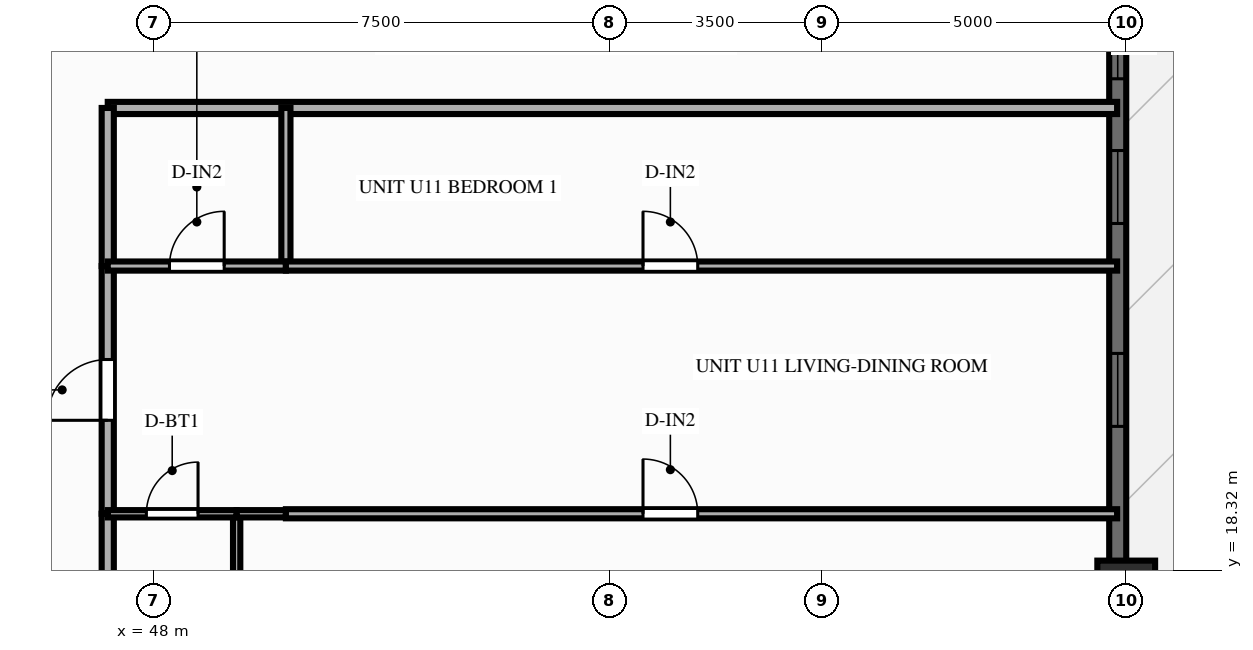
"""IFC4 building model, lengths in metres.
Left out: names, types, materials, properties, quantities, classifications, styles, units other than length and angle.
Written with IfcOpenShell. Run it as: python <this file> out.ifc"""

import sys

from ifc_helpers import new_model, si_unit, direction, frame, frame_2d, origin, origin_2d, place, context, subcontext, project, spatial, rectangle, extrude, source, transform, mapped, element, fill, save


model = new_model("IFC4")
c1 = context("Model", 3, precision=1e-05, world=origin(), true_north=direction((0.0, 1.0)))
c2 = subcontext(c1, "Body", "Model", "MODEL_VIEW")
j1 = project(units=[si_unit("LENGTHUNIT", "METRE"), si_unit("PLANEANGLEUNIT", "RADIAN")], contexts=[c1])
p1 = place(None, origin())
s1 = spatial("IfcSite", under=j1, at=p1, CompositionType="ELEMENT")
p2 = place(p1, origin())
s2 = spatial("IfcBuilding", under=s1, at=p2, CompositionType="ELEMENT")
p3 = place(p2, frame((0.0, 0.0, 107.85)))
s3 = spatial("IfcBuildingStorey", under=s2, at=p3, CompositionType="ELEMENT", Elevation=107.85)
m1 = source(origin(), c2, "Body", "SweptSolid", [
    extrude(rectangle(XDim=0.95, YDim=0.95, at=origin_2d()), origin(), (0.0, 0.0, 1.0), 3.0),
])
p4 = place(p3, frame((64.0, 18.0, 0.0), z_axis=(0.0, 0.0, 1.0), x_axis=(1.0, 0.0, 0.0)))
e1 = element("IfcColumn", 1, at=p4, inside=s3, PredefinedType="COLUMN", context=c2, shape_type="MappedRepresentation", body=[
    mapped(m1, transform((0.0, 0.0, 0.0), scale=1.0)),
])
p5 = place(p3, frame((63.86, 7.2, 0.0), z_axis=(0.0, 0.0, 1.0), x_axis=(0.0, 1.0, 0.0)))
e2 = element("IfcWall", 2, at=p5, inside=s3, PredefinedType="SOLIDWALL", context=c2, shape_type="SweptSolid", body=[
    extrude(rectangle(XDim=39.6, YDim=0.28, at=frame_2d((19.8, 0.0))), origin(), (0.0, 0.0, 1.0), 2.28),
])
p6 = place(p5, frame((0.945, 0.0, 0.25)))
e3 = element("IfcOpeningElement", 3, at=p6, cuts=e2, PredefinedType="OPENING", context=c2, shape_type="SweptSolid", body=[
    extrude(rectangle(XDim=1.2, YDim=1.5, at=frame_2d((0.6, 0.75))), frame((0.0, 0.152, 0.0), z_axis=(0.0, -1.0, 0.0), x_axis=(1.0, 0.0, 0.0)), (0.0, 0.0, 1.0), 0.304),
])
p7 = place(p5, frame((4.213, 0.0, 0.25)))
e4 = element("IfcOpeningElement", 4, at=p7, cuts=e2, PredefinedType="OPENING", context=c2, shape_type="SweptSolid", body=[
    extrude(rectangle(XDim=1.2, YDim=1.5, at=frame_2d((0.6, 0.75))), frame((0.0, 0.152, 0.0), z_axis=(0.0, -1.0, 0.0), x_axis=(1.0, 0.0, 0.0)), (0.0, 0.0, 1.0), 0.304),
])
p8 = place(p5, frame((7.55, 0.0, 0.25)))
e5 = element("IfcOpeningElement", 5, at=p8, cuts=e2, PredefinedType="OPENING", context=c2, shape_type="SweptSolid", body=[
    extrude(rectangle(XDim=1.2, YDim=1.5, at=frame_2d((0.6, 0.75))), frame((0.0, 0.152, 0.0), z_axis=(0.0, -1.0, 0.0), x_axis=(1.0, 0.0, 0.0)), (0.0, 0.0, 1.0), 0.304),
])
p9 = place(p5, frame((13.483, 0.0, 0.25)))
e6 = element("IfcOpeningElement", 6, at=p9, cuts=e2, PredefinedType="OPENING", context=c2, shape_type="SweptSolid", body=[
    extrude(rectangle(XDim=1.2, YDim=1.5, at=frame_2d((0.6, 0.75))), frame((0.0, 0.152, 0.0), z_axis=(0.0, -1.0, 0.0), x_axis=(1.0, 0.0, 0.0)), (0.0, 0.0, 1.0), 0.304),
])
p10 = place(p5, frame((16.82, 0.0, 0.25)))
e7 = element("IfcOpeningElement", 7, at=p10, cuts=e2, PredefinedType="OPENING", context=c2, shape_type="SweptSolid", body=[
    extrude(rectangle(XDim=1.2, YDim=1.5, at=frame_2d((0.6, 0.75))), frame((0.0, 0.152, 0.0), z_axis=(0.0, -1.0, 0.0), x_axis=(1.0, 0.0, 0.0)), (0.0, 0.0, 1.0), 0.304),
])
p11 = place(p5, frame((19.2, 0.0, 0.25)))
e8 = element("IfcOpeningElement", 8, at=p11, cuts=e2, PredefinedType="OPENING", context=c2, shape_type="SweptSolid", body=[
    extrude(rectangle(XDim=1.2, YDim=1.5, at=frame_2d((0.6, 0.75))), frame((0.0, 0.152, 0.0), z_axis=(0.0, -1.0, 0.0), x_axis=(1.0, 0.0, 0.0)), (0.0, 0.0, 1.0), 0.304),
])
p12 = place(p5, frame((21.578, 0.0, 0.25)))
e9 = element("IfcOpeningElement", 9, at=p12, cuts=e2, PredefinedType="OPENING", context=c2, shape_type="SweptSolid", body=[
    extrude(rectangle(XDim=1.2, YDim=1.5, at=frame_2d((0.6, 0.75))), frame((0.0, 0.152, 0.0), z_axis=(0.0, -1.0, 0.0), x_axis=(1.0, 0.0, 0.0)), (0.0, 0.0, 1.0), 0.304),
])
p13 = place(p5, frame((26.313, 0.0, 0.0), z_axis=(0.0, 0.0, 1.0), x_axis=(-1.0, 0.0, 0.0)))
e10 = element("IfcOpeningElement", 10, at=p13, cuts=e2, PredefinedType="OPENING", context=c2, shape_type="SweptSolid", body=[
    extrude(rectangle(XDim=1.6, YDim=2.15, at=frame_2d((0.8, 1.075))), frame((0.0, 0.152, 0.0), z_axis=(0.0, -1.0, 0.0), x_axis=(1.0, 0.0, 0.0)), (0.0, 0.0, 1.0), 0.304),
])
p14 = place(p5, frame((29.305, 0.0, 0.25)))
e11 = element("IfcOpeningElement", 11, at=p14, cuts=e2, PredefinedType="OPENING", context=c2, shape_type="SweptSolid", body=[
    extrude(rectangle(XDim=0.7, YDim=1.5, at=frame_2d((0.35, 0.75))), frame((0.0, 0.152, 0.0), z_axis=(0.0, -1.0, 0.0), x_axis=(1.0, 0.0, 0.0)), (0.0, 0.0, 1.0), 0.304),
])
p15 = place(p5, frame((30.848, 0.0, 0.25)))
e12 = element("IfcOpeningElement", 12, at=p15, cuts=e2, PredefinedType="OPENING", context=c2, shape_type="SweptSolid", body=[
    extrude(rectangle(XDim=1.2, YDim=1.5, at=frame_2d((0.6, 0.75))), frame((0.0, 0.152, 0.0), z_axis=(0.0, -1.0, 0.0), x_axis=(1.0, 0.0, 0.0)), (0.0, 0.0, 1.0), 0.304),
])
p16 = place(p5, frame((34.183, 0.0, 0.25)))
e13 = element("IfcOpeningElement", 13, at=p16, cuts=e2, PredefinedType="OPENING", context=c2, shape_type="SweptSolid", body=[
    extrude(rectangle(XDim=1.2, YDim=1.5, at=frame_2d((0.6, 0.75))), frame((0.0, 0.152, 0.0), z_axis=(0.0, -1.0, 0.0), x_axis=(1.0, 0.0, 0.0)), (0.0, 0.0, 1.0), 0.304),
])
p17 = place(p5, frame((37.452, 0.0, 0.25)))
e14 = element("IfcOpeningElement", 14, at=p17, cuts=e2, PredefinedType="OPENING", context=c2, shape_type="SweptSolid", body=[
    extrude(rectangle(XDim=1.2, YDim=1.5, at=frame_2d((0.6, 0.75))), frame((0.0, 0.152, 0.0), z_axis=(0.0, -1.0, 0.0), x_axis=(1.0, 0.0, 0.0)), (0.0, 0.0, 1.0), 0.304),
])
p18 = place(p3, frame((47.25, 25.92, 0.0), z_axis=(0.0, 0.0, 1.0), x_axis=(1.0, 0.0, 0.0)))
e15 = element("IfcWall", 15, at=p18, inside=s3, PredefinedType="PARTITIONING", context=c2, shape_type="SweptSolid", body=[
    extrude(rectangle(XDim=16.6, YDim=0.2, at=frame_2d((8.3, 0.0))), origin(), (0.0, 0.0, 1.0), 2.79),
])
p19 = place(p3, frame((47.25, 16.65, 0.0), z_axis=(0.0, 0.0, 1.0), x_axis=(0.0, 1.0, 0.0)))
e16 = element("IfcWall", 16, at=p19, inside=s3, PredefinedType="PARTITIONING", context=c2, shape_type="SweptSolid", body=[
    extrude(rectangle(XDim=2.596, YDim=0.2, at=frame_2d((1.298, 0.0))), origin(), (0.0, 0.0, 1.0), 2.79),
])
p20 = place(p3, frame((47.25, 19.246, 0.0), z_axis=(0.0, 0.0, 1.0), x_axis=(0.0, 1.0, 0.0)))
e17 = element("IfcWall", 17, at=p20, inside=s3, PredefinedType="PARTITIONING", context=c2, shape_type="SweptSolid", body=[
    extrude(rectangle(XDim=4.074, YDim=0.2, at=frame_2d((2.037, 0.0))), origin(), (0.0, 0.0, 1.0), 2.79),
])
p21 = place(p20, frame((1.537, 0.0, 0.0)))
e18 = element("IfcOpeningElement", 18, at=p21, cuts=e17, PredefinedType="OPENING", context=c2, shape_type="SweptSolid", body=[
    extrude(rectangle(XDim=1.0, YDim=2.15, at=frame_2d((0.5, 1.075))), frame((0.0, 0.112, 0.0), z_axis=(0.0, -1.0, 0.0), x_axis=(1.0, 0.0, 0.0)), (0.0, 0.0, 1.0), 0.224),
])
p22 = place(p3, frame((47.25, 23.32, 0.0), z_axis=(0.0, 0.0, 1.0), x_axis=(0.0, 1.0, 0.0)))
e19 = element("IfcWall", 19, at=p22, inside=s3, PredefinedType="PARTITIONING", context=c2, shape_type="SweptSolid", body=[
    extrude(rectangle(XDim=2.6, YDim=0.2, at=frame_2d((1.3, 0.0))), origin(), (0.0, 0.0, 1.0), 2.79),
])
p23 = place(p3, frame((49.37, 16.65, 0.0), z_axis=(0.0, 0.0, 1.0), x_axis=(0.0, 1.0, 0.0)))
e20 = element("IfcWall", 20, at=p23, inside=s3, PredefinedType="PARTITIONING", context=c2, shape_type="SweptSolid", body=[
    extrude(rectangle(XDim=2.596, YDim=0.12, at=frame_2d((1.298, 0.0))), origin(), (0.0, 0.0, 1.0), 2.79),
])
p24 = place(p3, frame((50.18, 23.32, 0.0), z_axis=(0.0, 0.0, 1.0), x_axis=(0.0, 1.0, 0.0)))
e21 = element("IfcWall", 21, at=p24, inside=s3, PredefinedType="PARTITIONING", context=c2, shape_type="SweptSolid", body=[
    extrude(rectangle(XDim=2.6, YDim=0.15, at=frame_2d((1.3, 0.0))), origin(), (0.0, 0.0, 1.0), 2.79),
])
p25 = place(p3, frame((47.25, 19.246, 0.0), z_axis=(0.0, 0.0, 1.0), x_axis=(1.0, 0.0, 0.0)))
e22 = element("IfcWall", 22, at=p25, inside=s3, PredefinedType="PARTITIONING", context=c2, shape_type="SweptSolid", body=[
    extrude(rectangle(XDim=2.12, YDim=0.12, at=frame_2d((1.06, 0.0))), origin(), (0.0, 0.0, 1.0), 2.79),
])
p26 = place(p25, frame((0.635, 0.0, 0.0)))
e23 = element("IfcOpeningElement", 23, at=p26, cuts=e22, PredefinedType="OPENING", context=c2, shape_type="SweptSolid", body=[
    extrude(rectangle(XDim=0.85, YDim=2.05, at=frame_2d((0.425, 1.025))), frame((0.0, 0.072, 0.0), z_axis=(0.0, -1.0, 0.0), x_axis=(1.0, 0.0, 0.0)), (0.0, 0.0, 1.0), 0.144),
])
p27 = place(p3, frame((49.37, 19.246, 0.0), z_axis=(0.0, 0.0, 1.0), x_axis=(1.0, 0.0, 0.0)))
e24 = element("IfcWall", 24, at=p27, inside=s3, PredefinedType="PARTITIONING", context=c2, shape_type="SweptSolid", body=[
    extrude(rectangle(XDim=0.81, YDim=0.12, at=frame_2d((0.405, 0.0))), origin(), (0.0, 0.0, 1.0), 2.79),
])
p28 = place(p3, frame((50.18, 19.246, 0.0), z_axis=(0.0, 0.0, 1.0), x_axis=(1.0, 0.0, 0.0)))
e25 = element("IfcWall", 25, at=p28, inside=s3, PredefinedType="PARTITIONING", context=c2, shape_type="SweptSolid", body=[
    extrude(rectangle(XDim=13.67, YDim=0.15, at=frame_2d((6.835, 0.0))), origin(), (0.0, 0.0, 1.0), 2.79),
])
p29 = place(p28, frame((5.873, 0.0, 0.0)))
e26 = element("IfcOpeningElement", 26, at=p29, cuts=e25, PredefinedType="OPENING", context=c2, shape_type="SweptSolid", body=[
    extrude(rectangle(XDim=0.9, YDim=2.1, at=frame_2d((0.45, 1.05))), frame((0.0, 0.087, 0.0), z_axis=(0.0, -1.0, 0.0), x_axis=(1.0, 0.0, 0.0)), (0.0, 0.0, 1.0), 0.174),
])
p30 = place(p3, frame((47.25, 23.32, 0.0), z_axis=(0.0, 0.0, 1.0), x_axis=(1.0, 0.0, 0.0)))
e27 = element("IfcWall", 27, at=p30, inside=s3, PredefinedType="PARTITIONING", context=c2, shape_type="SweptSolid", body=[
    extrude(rectangle(XDim=2.93, YDim=0.15, at=frame_2d((1.465, 0.0))), origin(), (0.0, 0.0, 1.0), 2.79),
])
p31 = place(p30, frame((1.015, 0.0, 0.0)))
e28 = element("IfcOpeningElement", 28, at=p31, cuts=e27, PredefinedType="OPENING", context=c2, shape_type="SweptSolid", body=[
    extrude(rectangle(XDim=0.9, YDim=2.1, at=frame_2d((0.45, 1.05))), frame((0.0, 0.087, 0.0), z_axis=(0.0, -1.0, 0.0), x_axis=(1.0, 0.0, 0.0)), (0.0, 0.0, 1.0), 0.174),
])
p32 = place(p3, frame((50.18, 23.32, 0.0), z_axis=(0.0, 0.0, 1.0), x_axis=(1.0, 0.0, 0.0)))
e29 = element("IfcWall", 29, at=p32, inside=s3, PredefinedType="PARTITIONING", context=c2, shape_type="SweptSolid", body=[
    extrude(rectangle(XDim=13.67, YDim=0.15, at=frame_2d((6.835, 0.0))), origin(), (0.0, 0.0, 1.0), 2.79),
])
p33 = place(p32, frame((5.873, 0.0, 0.0)))
e30 = element("IfcOpeningElement", 30, at=p33, cuts=e29, PredefinedType="OPENING", context=c2, shape_type="SweptSolid", body=[
    extrude(rectangle(XDim=0.9, YDim=2.1, at=frame_2d((0.45, 1.05))), frame((0.0, 0.087, 0.0), z_axis=(0.0, -1.0, 0.0), x_axis=(1.0, 0.0, 0.0)), (0.0, 0.0, 1.0), 0.174),
])
m2 = source(origin(), c2, "Body", "SweptSolid", [
    extrude(rectangle(XDim=1.2, YDim=1.5, at=frame_2d((0.6, 0.75))), frame((0.0, 0.03, 0.0), z_axis=(0.0, -1.0, 0.0), x_axis=(1.0, 0.0, 0.0)), (0.0, 0.0, 1.0), 0.06),
])
p34 = place(p9, origin())
e31 = element("IfcWindow", 31, at=p34, inside=s3, PartitioningType="SINGLE_PANEL", PredefinedType="WINDOW", context=c2, shape_type="MappedRepresentation", body=[
    mapped(m2, transform((0.0, 0.0, 0.0), scale=1.0)),
])
fill(e6, e31)
p35 = place(p10, origin())
e32 = element("IfcWindow", 32, at=p35, inside=s3, PartitioningType="SINGLE_PANEL", PredefinedType="WINDOW", context=c2, shape_type="MappedRepresentation", body=[
    mapped(m2, transform((0.0, 0.0, 0.0), scale=1.0)),
])
fill(e7, e32)
p36 = place(p11, origin())
e33 = element("IfcWindow", 33, at=p36, inside=s3, PartitioningType="SINGLE_PANEL", PredefinedType="WINDOW", context=c2, shape_type="MappedRepresentation", body=[
    mapped(m2, transform((0.0, 0.0, 0.0), scale=1.0)),
])
fill(e8, e33)
m3 = source(origin(), c2, "Body", "SweptSolid", [
    extrude(rectangle(XDim=1.0, YDim=2.15, at=frame_2d((0.5, 1.075))), frame((0.0, 0.025, 0.0), z_axis=(0.0, -1.0, 0.0), x_axis=(1.0, 0.0, 0.0)), (0.0, 0.0, 1.0), 0.05),
])
p37 = place(p21, origin())
e34 = element("IfcDoor", 34, at=p37, inside=s3, OperationType="SINGLE_SWING_LEFT", PredefinedType="DOOR", context=c2, shape_type="MappedRepresentation", body=[
    mapped(m3, transform((0.0, 0.0, 0.0), scale=1.0)),
])
fill(e18, e34)
m4 = source(origin(), c2, "Body", "SweptSolid", [
    extrude(rectangle(XDim=0.85, YDim=2.05, at=frame_2d((0.425, 1.025))), frame((0.0, 0.025, 0.0), z_axis=(0.0, -1.0, 0.0), x_axis=(1.0, 0.0, 0.0)), (0.0, 0.0, 1.0), 0.05),
])
p38 = place(p26, origin())
e35 = element("IfcDoor", 35, at=p38, inside=s3, OperationType="SINGLE_SWING_RIGHT", PredefinedType="DOOR", context=c2, shape_type="MappedRepresentation", body=[
    mapped(m4, transform((0.0, 0.0, 0.0), scale=1.0)),
])
fill(e23, e35)
m5 = source(origin(), c2, "Body", "SweptSolid", [
    extrude(rectangle(XDim=0.9, YDim=2.1, at=frame_2d((0.45, 1.05))), frame((0.0, 0.025, 0.0), z_axis=(0.0, -1.0, 0.0), x_axis=(1.0, 0.0, 0.0)), (0.0, 0.0, 1.0), 0.05),
])
p39 = place(p29, origin())
e36 = element("IfcDoor", 36, at=p39, inside=s3, OperationType="SINGLE_SWING_LEFT", PredefinedType="DOOR", context=c2, shape_type="MappedRepresentation", body=[
    mapped(m5, transform((0.0, 0.0, 0.0), scale=1.0)),
])
fill(e26, e36)
p40 = place(p31, origin())
e37 = element("IfcDoor", 37, at=p40, inside=s3, OperationType="SINGLE_SWING_RIGHT", PredefinedType="DOOR", context=c2, shape_type="MappedRepresentation", body=[
    mapped(m5, transform((0.0, 0.0, 0.0), scale=1.0)),
])
fill(e28, e37)
p41 = place(p33, origin())
e38 = element("IfcDoor", 38, at=p41, inside=s3, OperationType="SINGLE_SWING_LEFT", PredefinedType="DOOR", context=c2, shape_type="MappedRepresentation", body=[
    mapped(m5, transform((0.0, 0.0, 0.0), scale=1.0)),
])
fill(e30, e38)
save(model, sys.argv[1])
